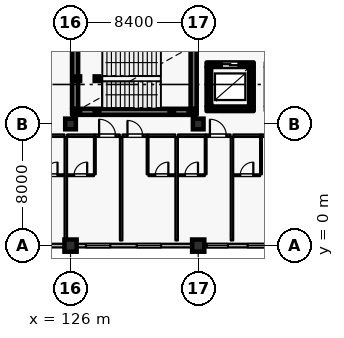
"""IFC4 building model, lengths in metres.
Left out: names, types, materials, properties, quantities, classifications, styles, units other than length and angle.
Written with IfcOpenShell. Run it as: python <this file> out.ifc"""

import sys

from ifc_helpers import new_model, si_unit, direction, frame, frame_2d, origin, origin_2d, place, context, subcontext, project, spatial, rectangle, hollow_rectangle, extrude, element, fill, save


model = new_model("IFC4")
c1 = context("Model", 3, precision=1e-05, world=origin(), true_north=direction((0.0, 1.0)))
c2 = subcontext(c1, "Body", "Model", "MODEL_VIEW")
j1 = project(units=[si_unit("LENGTHUNIT", "METRE"), si_unit("PLANEANGLEUNIT", "RADIAN")], contexts=[c1])
p1 = place(None, origin())
s1 = spatial("IfcSite", under=j1, at=p1, CompositionType="ELEMENT")
p2 = place(p1, origin())
s2 = spatial("IfcBuilding", under=s1, at=p2, CompositionType="ELEMENT")
p3 = place(p2, frame((0.0, 0.0, 11.4)))
s3 = spatial("IfcBuildingStorey", under=s2, at=p3, CompositionType="ELEMENT", Elevation=11.4)
for number, where, z_axis, x_axis in (
    (1, (126.0, 0.0, 0.0), (0.0, 0.0, 1.0), (1.0, 0.0, 0.0)),
    (2, (134.4, 0.0, 0.0), (0.0, 0.0, 1.0), (1.0, 0.0, 0.0)),
):
    element("IfcColumn", number, at=place(p3, frame(where, z_axis=z_axis, x_axis=x_axis)), inside=s3, PredefinedType="COLUMN", context=c2, shape_type="SweptSolid", body=[
        extrude(rectangle(XDim=0.8, YDim=0.8, at=origin_2d()), origin(), (0.0, 0.0, 1.0), 4.8),
    ])
for number, where, z_axis, x_axis in (
    (3, (126.0, 8.0, 0.0), (0.0, 0.0, 1.0), (1.0, 0.0, 0.0)),
    (4, (134.4, 8.0, 0.0), (0.0, 0.0, 1.0), (1.0, 0.0, 0.0)),
):
    element("IfcColumn", number, at=place(p3, frame(where, z_axis=z_axis, x_axis=x_axis)), inside=s3, PredefinedType="COLUMN", context=c2, shape_type="SweptSolid", body=[
        extrude(rectangle(XDim=0.7, YDim=0.7, at=origin_2d()), origin(), (0.0, 0.0, 1.0), 4.8),
    ])
p4 = place(p3, frame((125.6, 0.0, 0.0), z_axis=(0.0, 0.0, 1.0), x_axis=(-1.0, 0.0, 0.0)))
e5 = element("IfcWall", 5, at=p4, inside=s3, PredefinedType="SOLIDWALL", context=c2, shape_type="SweptSolid", body=[
    extrude(rectangle(XDim=7.6, YDim=0.24, at=frame_2d((3.8, 0.0))), origin(), (0.0, 0.0, 1.0), 4.13),
])
p5 = place(p4, frame((0.935, 0.0, 0.8)))
e6 = element("IfcOpeningElement", 6, at=p5, cuts=e5, PredefinedType="OPENING", context=c2, shape_type="SweptSolid", body=[
    extrude(rectangle(XDim=1.6, YDim=1.6, at=frame_2d((0.8, 0.8))), frame((0.0, 0.13, 0.0), z_axis=(0.0, -1.0, 0.0), x_axis=(1.0, 0.0, 0.0)), (0.0, 0.0, 1.0), 0.26),
])
p6 = place(p4, frame((4.58, 0.0, 0.8)))
e7 = element("IfcOpeningElement", 7, at=p6, cuts=e5, PredefinedType="OPENING", context=c2, shape_type="SweptSolid", body=[
    extrude(rectangle(XDim=1.6, YDim=1.6, at=frame_2d((0.8, 0.8))), frame((0.0, 0.13, 0.0), z_axis=(0.0, -1.0, 0.0), x_axis=(1.0, 0.0, 0.0)), (0.0, 0.0, 1.0), 0.26),
])
p7 = place(p3, frame((134.0, 0.0, 0.0), z_axis=(0.0, 0.0, 1.0), x_axis=(-1.0, 0.0, 0.0)))
e8 = element("IfcWall", 8, at=p7, inside=s3, PredefinedType="SOLIDWALL", context=c2, shape_type="SweptSolid", body=[
    extrude(rectangle(XDim=7.6, YDim=0.24, at=frame_2d((3.8, 0.0))), origin(), (0.0, 0.0, 1.0), 4.13),
])
p8 = place(p7, frame((2.045, 0.0, 0.8)))
e9 = element("IfcOpeningElement", 9, at=p8, cuts=e8, PredefinedType="OPENING", context=c2, shape_type="SweptSolid", body=[
    extrude(rectangle(XDim=1.6, YDim=1.6, at=frame_2d((0.8, 0.8))), frame((0.0, 0.13, 0.0), z_axis=(0.0, -1.0, 0.0), x_axis=(1.0, 0.0, 0.0)), (0.0, 0.0, 1.0), 0.26),
])
p9 = place(p7, frame((5.385, 0.0, 0.8)))
e10 = element("IfcOpeningElement", 10, at=p9, cuts=e8, PredefinedType="OPENING", context=c2, shape_type="SweptSolid", body=[
    extrude(rectangle(XDim=1.6, YDim=1.6, at=frame_2d((0.8, 0.8))), frame((0.0, 0.13, 0.0), z_axis=(0.0, -1.0, 0.0), x_axis=(1.0, 0.0, 0.0)), (0.0, 0.0, 1.0), 0.26),
])
p10 = place(p3, frame((142.4, 0.0, 0.0), z_axis=(0.0, 0.0, 1.0), x_axis=(-1.0, 0.0, 0.0)))
e11 = element("IfcWall", 11, at=p10, inside=s3, PredefinedType="SOLIDWALL", context=c2, shape_type="SweptSolid", body=[
    extrude(rectangle(XDim=7.6, YDim=0.24, at=frame_2d((3.8, 0.0))), origin(), (0.0, 0.0, 1.0), 4.13),
])
p11 = place(p10, frame((0.215, 0.0, 0.8)))
e12 = element("IfcOpeningElement", 12, at=p11, cuts=e11, PredefinedType="OPENING", context=c2, shape_type="SweptSolid", body=[
    extrude(rectangle(XDim=1.6, YDim=1.6, at=frame_2d((0.8, 0.8))), frame((0.0, 0.13, 0.0), z_axis=(0.0, -1.0, 0.0), x_axis=(1.0, 0.0, 0.0)), (0.0, 0.0, 1.0), 0.26),
])
p12 = place(p10, frame((3.155, 0.0, 0.8)))
e13 = element("IfcOpeningElement", 13, at=p12, cuts=e11, PredefinedType="OPENING", context=c2, shape_type="SweptSolid", body=[
    extrude(rectangle(XDim=1.6, YDim=1.6, at=frame_2d((0.8, 0.8))), frame((0.0, 0.13, 0.0), z_axis=(0.0, -1.0, 0.0), x_axis=(1.0, 0.0, 0.0)), (0.0, 0.0, 1.0), 0.26),
])
p13 = place(p10, frame((6.04, 0.0, 0.8)))
e14 = element("IfcOpeningElement", 14, at=p13, cuts=e11, PredefinedType="OPENING", context=c2, shape_type="SweptSolid", body=[
    extrude(rectangle(XDim=1.4, YDim=1.6, at=frame_2d((0.7, 0.8))), frame((0.0, 0.13, 0.0), z_axis=(0.0, -1.0, 0.0), x_axis=(1.0, 0.0, 0.0)), (0.0, 0.0, 1.0), 0.26),
])
p14 = place(p3, frame((134.95, 9.0, 0.0), z_axis=(0.0, 0.0, 1.0), x_axis=(1.0, 0.0, 0.0)))
e15 = element("IfcWall", 15, at=p14, inside=s3, PredefinedType="SHEAR", context=c2, shape_type="SweptSolid", body=[
    extrude(rectangle(XDim=3.1, YDim=0.3, at=frame_2d((1.55, 0.0))), origin(), (0.0, 0.0, 1.0), 4.535),
])
p15 = place(p3, frame((137.9, 9.155, 0.0), z_axis=(0.0, 0.0, 1.0), x_axis=(0.0, 1.0, 0.0)))
e16 = element("IfcWall", 16, at=p15, inside=s3, PredefinedType="SHEAR", context=c2, shape_type="SweptSolid", body=[
    extrude(rectangle(XDim=2.59, YDim=0.3, at=frame_2d((1.295, 0.0))), origin(), (0.0, 0.0, 1.0), 4.535),
])
p16 = place(p3, frame((138.05, 11.9, 0.0), z_axis=(0.0, 0.0, 1.0), x_axis=(-1.0, 0.0, 0.0)))
e17 = element("IfcWall", 17, at=p16, inside=s3, PredefinedType="SHEAR", context=c2, shape_type="SweptSolid", body=[
    extrude(rectangle(XDim=3.1, YDim=0.3, at=frame_2d((1.55, 0.0))), origin(), (0.0, 0.0, 1.0), 4.535),
])
p17 = place(p16, frame((1.0, 0.0, 0.0)))
e18 = element("IfcOpeningElement", 18, at=p17, cuts=e17, PredefinedType="OPENING", context=c2, shape_type="SweptSolid", body=[
    extrude(rectangle(XDim=1.1, YDim=2.2, at=frame_2d((0.55, 1.1))), frame((0.0, 0.16, 0.0), z_axis=(0.0, -1.0, 0.0), x_axis=(1.0, 0.0, 0.0)), (0.0, 0.0, 1.0), 0.32),
])
p18 = place(p3, frame((135.1, 11.745, 0.0), z_axis=(0.0, 0.0, 1.0), x_axis=(0.0, -1.0, 0.0)))
e19 = element("IfcWall", 19, at=p18, inside=s3, PredefinedType="SHEAR", context=c2, shape_type="SweptSolid", body=[
    extrude(rectangle(XDim=2.59, YDim=0.3, at=frame_2d((1.295, 0.0))), origin(), (0.0, 0.0, 1.0), 4.535),
])
p19 = place(p3, frame((126.1, 8.8, 0.0), z_axis=(0.0, 0.0, 1.0), x_axis=(1.0, 0.0, 0.0)))
e20 = element("IfcWall", 20, at=p19, inside=s3, PredefinedType="SHEAR", context=c2, shape_type="SweptSolid", body=[
    extrude(rectangle(XDim=8.2, YDim=0.4, at=frame_2d((4.1, 0.0))), origin(), (0.0, 0.0, 1.0), 4.535),
])
for number, where, z_axis, x_axis in (
    (21, (134.1, 9.005, 0.0), (0.0, 0.0, 1.0), (0.0, 1.0, 0.0)),
    (22, (126.3, 9.005, 0.0), (0.0, 0.0, 1.0), (0.0, 1.0, 0.0)),
):
    element("IfcWall", number, at=place(p3, frame(where, z_axis=z_axis, x_axis=x_axis)), inside=s3, PredefinedType="SHEAR", context=c2, shape_type="SweptSolid", body=[
        extrude(rectangle(XDim=3.95, YDim=0.4, at=frame_2d((1.975, 0.0))), origin(), (0.0, 0.0, 1.0), 4.535),
    ])
for number, where, z_axis, x_axis in (
    (23, (126.48, 8.8, 0.0), (0.0, 0.0, 1.0), (1.0, 0.0, 0.0)),
    (24, (126.48, 10.98, 0.0), (0.0, 0.0, 1.0), (1.0, 0.0, 0.0)),
    (25, (127.74, 8.8, 0.0), (0.0, 0.0, 1.0), (1.0, 0.0, 0.0)),
    (26, (127.74, 10.98, 0.0), (0.0, 0.0, 1.0), (1.0, 0.0, 0.0)),
):
    element("IfcColumn", number, at=place(p3, frame(where, z_axis=z_axis, x_axis=x_axis)), inside=s3, PredefinedType="COLUMN", context=c2, shape_type="SweptSolid", body=[
        extrude(hollow_rectangle(XDim=0.3, YDim=0.3, WallThickness=0.012, at=origin_2d()), origin(), (0.0, 0.0, 1.0), 4.62),
    ])
for number, where, z_axis, x_axis in (
    (27, (132.66, 8.8, -2.7), (0.0, 0.0, 1.0), (1.0, 0.0, 0.0)),
    (28, (133.92, 8.8, -2.7), (0.0, 0.0, 1.0), (1.0, 0.0, 0.0)),
):
    element("IfcColumn", number, at=place(p3, frame(where, z_axis=z_axis, x_axis=x_axis)), inside=s3, PredefinedType="COLUMN", context=c2, shape_type="SweptSolid", body=[
        extrude(hollow_rectangle(XDim=0.3, YDim=0.3, WallThickness=0.012, at=origin_2d()), origin(), (0.0, 0.0, 1.0), 4.92),
    ])
p20 = place(p3, frame((123.79, 7.23, 0.0), z_axis=(0.0, 0.0, 1.0), x_axis=(1.0, 0.0, 0.0)))
e29 = element("IfcWall", 29, at=p20, inside=s3, PredefinedType="PARTITIONING", context=c2, shape_type="SweptSolid", body=[
    extrude(rectangle(XDim=1.81, YDim=0.16, at=frame_2d((0.905, 0.0))), origin(), (0.0, 0.0, 1.0), 4.535),
])
p21 = place(p3, frame((123.84, 4.63, 0.0), z_axis=(0.0, 0.0, 1.0), x_axis=(1.0, 0.0, 0.0)))
e30 = element("IfcWall", 30, at=p21, inside=s3, PredefinedType="PARTITIONING", context=c2, shape_type="SweptSolid", body=[
    extrude(rectangle(XDim=1.75, YDim=0.115, at=frame_2d((0.875, 0.0))), origin(), (0.0, 0.0, 1.0), 4.535),
])
p22 = place(p21, frame((0.445, 0.0, 0.0)))
e31 = element("IfcOpeningElement", 31, at=p22, cuts=e30, PredefinedType="OPENING", context=c2, shape_type="SweptSolid", body=[
    extrude(rectangle(XDim=0.86, YDim=2.12, at=frame_2d((0.43, 1.06))), frame((0.0, 0.067, 0.0), z_axis=(0.0, -1.0, 0.0), x_axis=(1.0, 0.0, 0.0)), (0.0, 0.0, 1.0), 0.135),
])
p23 = place(p3, frame((125.78, 7.23, 0.0), z_axis=(0.0, 0.0, 1.0), x_axis=(1.0, 0.0, 0.0)))
e32 = element("IfcWall", 32, at=p23, inside=s3, PredefinedType="PARTITIONING", context=c2, shape_type="SweptSolid", body=[
    extrude(rectangle(XDim=1.81, YDim=0.16, at=frame_2d((0.905, 0.0))), origin(), (0.0, 0.0, 1.0), 4.535),
])
p24 = place(p3, frame((127.6, 7.23, 0.0), z_axis=(0.0, 0.0, 1.0), x_axis=(1.0, 0.0, 0.0)))
e33 = element("IfcWall", 33, at=p24, inside=s3, PredefinedType="PARTITIONING", context=c2, shape_type="SweptSolid", body=[
    extrude(rectangle(XDim=1.64, YDim=0.16, at=frame_2d((0.82, 0.0))), origin(), (0.0, 0.0, 1.0), 4.535),
])
p25 = place(p24, frame((0.28, 0.0, 0.0)))
e34 = element("IfcOpeningElement", 34, at=p25, cuts=e33, PredefinedType="OPENING", context=c2, shape_type="SweptSolid", body=[
    extrude(rectangle(XDim=1.08, YDim=2.3, at=frame_2d((0.54, 1.15))), frame((0.0, 0.09, 0.0), z_axis=(0.0, -1.0, 0.0), x_axis=(1.0, 0.0, 0.0)), (0.0, 0.0, 1.0), 0.18),
])
p26 = place(p3, frame((127.6, 4.69, 0.0), z_axis=(0.0, 0.0, 1.0), x_axis=(0.0, 1.0, 0.0)))
e35 = element("IfcWall", 35, at=p26, inside=s3, PredefinedType="PARTITIONING", context=c2, shape_type="SweptSolid", body=[
    extrude(rectangle(XDim=2.45, YDim=0.115, at=frame_2d((1.225, 0.0))), origin(), (0.0, 0.0, 1.0), 4.535),
])
p27 = place(p3, frame((125.79, 4.63, 0.0), z_axis=(0.0, 0.0, 1.0), x_axis=(1.0, 0.0, 0.0)))
e36 = element("IfcWall", 36, at=p27, inside=s3, PredefinedType="PARTITIONING", context=c2, shape_type="SweptSolid", body=[
    extrude(rectangle(XDim=1.75, YDim=0.115, at=frame_2d((0.875, 0.0))), origin(), (0.0, 0.0, 1.0), 4.535),
])
p28 = place(p27, frame((0.445, 0.0, 0.0)))
e37 = element("IfcOpeningElement", 37, at=p28, cuts=e36, PredefinedType="OPENING", context=c2, shape_type="SweptSolid", body=[
    extrude(rectangle(XDim=0.86, YDim=2.12, at=frame_2d((0.43, 1.06))), frame((0.0, 0.067, 0.0), z_axis=(0.0, -1.0, 0.0), x_axis=(1.0, 0.0, 0.0)), (0.0, 0.0, 1.0), 0.135),
])
p29 = place(p3, frame((125.69, 0.34, 0.0), z_axis=(0.0, 0.0, 1.0), x_axis=(0.0, 1.0, 0.0)))
e38 = element("IfcWall", 38, at=p29, inside=s3, PredefinedType="PARTITIONING", context=c2, shape_type="SweptSolid", body=[
    extrude(rectangle(XDim=6.8, YDim=0.16, at=frame_2d((3.4, 0.0))), origin(), (0.0, 0.0, 1.0), 4.535),
])
p30 = place(p3, frame((129.42, 7.23, 0.0), z_axis=(0.0, 0.0, 1.0), x_axis=(1.0, 0.0, 0.0)))
e39 = element("IfcWall", 39, at=p30, inside=s3, PredefinedType="PARTITIONING", context=c2, shape_type="SweptSolid", body=[
    extrude(rectangle(XDim=1.65, YDim=0.16, at=frame_2d((0.825, 0.0))), origin(), (0.0, 0.0, 1.0), 4.535),
])
p31 = place(p30, frame((0.325, 0.0, 0.0)))
e40 = element("IfcOpeningElement", 40, at=p31, cuts=e39, PredefinedType="OPENING", context=c2, shape_type="SweptSolid", body=[
    extrude(rectangle(XDim=1.0, YDim=2.25, at=frame_2d((0.5, 1.125))), frame((0.0, 0.09, 0.0), z_axis=(0.0, -1.0, 0.0), x_axis=(1.0, 0.0, 0.0)), (0.0, 0.0, 1.0), 0.18),
])
p32 = place(p3, frame((131.08, 7.23, 0.0), z_axis=(0.0, 0.0, 1.0), x_axis=(1.0, 0.0, 0.0)))
e41 = element("IfcWall", 41, at=p32, inside=s3, PredefinedType="PARTITIONING", context=c2, shape_type="SweptSolid", body=[
    extrude(rectangle(XDim=1.81, YDim=0.16, at=frame_2d((0.905, 0.0))), origin(), (0.0, 0.0, 1.0), 4.535),
])
p33 = place(p3, frame((131.07, 4.69, 0.0), z_axis=(0.0, 0.0, 1.0), x_axis=(0.0, 1.0, 0.0)))
e42 = element("IfcWall", 42, at=p33, inside=s3, PredefinedType="PARTITIONING", context=c2, shape_type="SweptSolid", body=[
    extrude(rectangle(XDim=2.45, YDim=0.115, at=frame_2d((1.225, 0.0))), origin(), (0.0, 0.0, 1.0), 4.535),
])
p34 = place(p3, frame((131.13, 4.63, 0.0), z_axis=(0.0, 0.0, 1.0), x_axis=(1.0, 0.0, 0.0)))
e43 = element("IfcWall", 43, at=p34, inside=s3, PredefinedType="PARTITIONING", context=c2, shape_type="SweptSolid", body=[
    extrude(rectangle(XDim=1.75, YDim=0.115, at=frame_2d((0.875, 0.0))), origin(), (0.0, 0.0, 1.0), 4.535),
])
p35 = place(p34, frame((0.445, 0.0, 0.0)))
e44 = element("IfcOpeningElement", 44, at=p35, cuts=e43, PredefinedType="OPENING", context=c2, shape_type="SweptSolid", body=[
    extrude(rectangle(XDim=0.86, YDim=2.12, at=frame_2d((0.43, 1.06))), frame((0.0, 0.067, 0.0), z_axis=(0.0, -1.0, 0.0), x_axis=(1.0, 0.0, 0.0)), (0.0, 0.0, 1.0), 0.135),
])
p36 = place(p3, frame((129.33, 0.34, 0.0), z_axis=(0.0, 0.0, 1.0), x_axis=(0.0, 1.0, 0.0)))
e45 = element("IfcWall", 45, at=p36, inside=s3, PredefinedType="PARTITIONING", context=c2, shape_type="SweptSolid", body=[
    extrude(rectangle(XDim=6.8, YDim=0.16, at=frame_2d((3.4, 0.0))), origin(), (0.0, 0.0, 1.0), 4.535),
])
p37 = place(p3, frame((133.07, 7.23, 0.0), z_axis=(0.0, 0.0, 1.0), x_axis=(1.0, 0.0, 0.0)))
e46 = element("IfcWall", 46, at=p37, inside=s3, PredefinedType="PARTITIONING", context=c2, shape_type="SweptSolid", body=[
    extrude(rectangle(XDim=1.81, YDim=0.16, at=frame_2d((0.905, 0.0))), origin(), (0.0, 0.0, 1.0), 4.535),
])
p38 = place(p3, frame((134.89, 7.23, 0.0), z_axis=(0.0, 0.0, 1.0), x_axis=(1.0, 0.0, 0.0)))
e47 = element("IfcWall", 47, at=p38, inside=s3, PredefinedType="PARTITIONING", context=c2, shape_type="SweptSolid", body=[
    extrude(rectangle(XDim=1.64, YDim=0.16, at=frame_2d((0.82, 0.0))), origin(), (0.0, 0.0, 1.0), 4.535),
])
p39 = place(p38, frame((0.28, 0.0, 0.0)))
e48 = element("IfcOpeningElement", 48, at=p39, cuts=e47, PredefinedType="OPENING", context=c2, shape_type="SweptSolid", body=[
    extrude(rectangle(XDim=1.08, YDim=2.3, at=frame_2d((0.54, 1.15))), frame((0.0, 0.09, 0.0), z_axis=(0.0, -1.0, 0.0), x_axis=(1.0, 0.0, 0.0)), (0.0, 0.0, 1.0), 0.18),
])
p40 = place(p3, frame((134.89, 4.69, 0.0), z_axis=(0.0, 0.0, 1.0), x_axis=(0.0, 1.0, 0.0)))
e49 = element("IfcWall", 49, at=p40, inside=s3, PredefinedType="PARTITIONING", context=c2, shape_type="SweptSolid", body=[
    extrude(rectangle(XDim=2.45, YDim=0.115, at=frame_2d((1.225, 0.0))), origin(), (0.0, 0.0, 1.0), 4.535),
])
p41 = place(p3, frame((133.08, 4.63, 0.0), z_axis=(0.0, 0.0, 1.0), x_axis=(1.0, 0.0, 0.0)))
e50 = element("IfcWall", 50, at=p41, inside=s3, PredefinedType="PARTITIONING", context=c2, shape_type="SweptSolid", body=[
    extrude(rectangle(XDim=1.75, YDim=0.115, at=frame_2d((0.875, 0.0))), origin(), (0.0, 0.0, 1.0), 4.535),
])
p42 = place(p41, frame((0.445, 0.0, 0.0)))
e51 = element("IfcOpeningElement", 51, at=p42, cuts=e50, PredefinedType="OPENING", context=c2, shape_type="SweptSolid", body=[
    extrude(rectangle(XDim=0.86, YDim=2.12, at=frame_2d((0.43, 1.06))), frame((0.0, 0.067, 0.0), z_axis=(0.0, -1.0, 0.0), x_axis=(1.0, 0.0, 0.0)), (0.0, 0.0, 1.0), 0.135),
])
p43 = place(p3, frame((132.98, 0.34, 0.0), z_axis=(0.0, 0.0, 1.0), x_axis=(0.0, 1.0, 0.0)))
e52 = element("IfcWall", 52, at=p43, inside=s3, PredefinedType="PARTITIONING", context=c2, shape_type="SweptSolid", body=[
    extrude(rectangle(XDim=6.8, YDim=0.16, at=frame_2d((3.4, 0.0))), origin(), (0.0, 0.0, 1.0), 4.535),
])
p44 = place(p3, frame((136.71, 7.23, 0.0), z_axis=(0.0, 0.0, 1.0), x_axis=(1.0, 0.0, 0.0)))
e53 = element("IfcWall", 53, at=p44, inside=s3, PredefinedType="PARTITIONING", context=c2, shape_type="SweptSolid", body=[
    extrude(rectangle(XDim=1.81, YDim=0.16, at=frame_2d((0.905, 0.0))), origin(), (0.0, 0.0, 1.0), 4.535),
])
p45 = place(p3, frame((138.53, 7.23, 0.0), z_axis=(0.0, 0.0, 1.0), x_axis=(1.0, 0.0, 0.0)))
e54 = element("IfcWall", 54, at=p45, inside=s3, PredefinedType="PARTITIONING", context=c2, shape_type="SweptSolid", body=[
    extrude(rectangle(XDim=1.65, YDim=0.16, at=frame_2d((0.825, 0.0))), origin(), (0.0, 0.0, 1.0), 4.535),
])
p46 = place(p45, frame((0.325, 0.0, 0.0)))
e55 = element("IfcOpeningElement", 55, at=p46, cuts=e54, PredefinedType="OPENING", context=c2, shape_type="SweptSolid", body=[
    extrude(rectangle(XDim=1.0, YDim=2.25, at=frame_2d((0.5, 1.125))), frame((0.0, 0.09, 0.0), z_axis=(0.0, -1.0, 0.0), x_axis=(1.0, 0.0, 0.0)), (0.0, 0.0, 1.0), 0.18),
])
p47 = place(p3, frame((138.53, 4.69, 0.0), z_axis=(0.0, 0.0, 1.0), x_axis=(0.0, 1.0, 0.0)))
e56 = element("IfcWall", 56, at=p47, inside=s3, PredefinedType="PARTITIONING", context=c2, shape_type="SweptSolid", body=[
    extrude(rectangle(XDim=2.45, YDim=0.115, at=frame_2d((1.225, 0.0))), origin(), (0.0, 0.0, 1.0), 4.535),
])
p48 = place(p3, frame((136.72, 4.63, 0.0), z_axis=(0.0, 0.0, 1.0), x_axis=(1.0, 0.0, 0.0)))
e57 = element("IfcWall", 57, at=p48, inside=s3, PredefinedType="PARTITIONING", context=c2, shape_type="SweptSolid", body=[
    extrude(rectangle(XDim=1.75, YDim=0.115, at=frame_2d((0.875, 0.0))), origin(), (0.0, 0.0, 1.0), 4.535),
])
p49 = place(p48, frame((0.445, 0.0, 0.0)))
e58 = element("IfcOpeningElement", 58, at=p49, cuts=e57, PredefinedType="OPENING", context=c2, shape_type="SweptSolid", body=[
    extrude(rectangle(XDim=0.86, YDim=2.12, at=frame_2d((0.43, 1.06))), frame((0.0, 0.067, 0.0), z_axis=(0.0, -1.0, 0.0), x_axis=(1.0, 0.0, 0.0)), (0.0, 0.0, 1.0), 0.135),
])
p50 = place(p3, frame((136.62, 0.34, 0.0), z_axis=(0.0, 0.0, 1.0), x_axis=(0.0, 1.0, 0.0)))
e59 = element("IfcWall", 59, at=p50, inside=s3, PredefinedType="PARTITIONING", context=c2, shape_type="SweptSolid", body=[
    extrude(rectangle(XDim=6.8, YDim=0.16, at=frame_2d((3.4, 0.0))), origin(), (0.0, 0.0, 1.0), 4.535),
])
p51 = place(p8, origin())
e60 = element("IfcWindow", 60, at=p51, inside=s3, PartitioningType="SINGLE_PANEL", PredefinedType="WINDOW", context=c2, shape_type="SweptSolid", body=[
    extrude(rectangle(XDim=1.6, YDim=1.6, at=frame_2d((0.8, 0.8))), frame((0.0, 0.03, 0.0), z_axis=(0.0, -1.0, 0.0), x_axis=(1.0, 0.0, 0.0)), (0.0, 0.0, 1.0), 0.06),
])
fill(e9, e60)
p52 = place(p9, origin())
e61 = element("IfcWindow", 61, at=p52, inside=s3, PartitioningType="SINGLE_PANEL", PredefinedType="WINDOW", context=c2, shape_type="SweptSolid", body=[
    extrude(rectangle(XDim=1.6, YDim=1.6, at=frame_2d((0.8, 0.8))), frame((0.0, 0.03, 0.0), z_axis=(0.0, -1.0, 0.0), x_axis=(1.0, 0.0, 0.0)), (0.0, 0.0, 1.0), 0.06),
])
fill(e10, e61)
p53 = place(p12, origin())
e62 = element("IfcWindow", 62, at=p53, inside=s3, PartitioningType="SINGLE_PANEL", PredefinedType="WINDOW", context=c2, shape_type="SweptSolid", body=[
    extrude(rectangle(XDim=1.6, YDim=1.6, at=frame_2d((0.8, 0.8))), frame((0.0, 0.03, 0.0), z_axis=(0.0, -1.0, 0.0), x_axis=(1.0, 0.0, 0.0)), (0.0, 0.0, 1.0), 0.06),
])
fill(e13, e62)
p54 = place(p13, origin())
e63 = element("IfcWindow", 63, at=p54, inside=s3, PartitioningType="SINGLE_PANEL", PredefinedType="WINDOW", context=c2, shape_type="SweptSolid", body=[
    extrude(rectangle(XDim=1.4, YDim=1.6, at=frame_2d((0.7, 0.8))), frame((0.0, 0.03, 0.0), z_axis=(0.0, -1.0, 0.0), x_axis=(1.0, 0.0, 0.0)), (0.0, 0.0, 1.0), 0.06),
])
fill(e14, e63)
p55 = place(p17, origin())
e64 = element("IfcDoor", 64, at=p55, inside=s3, OperationType="DOUBLE_DOOR_SLIDING", PredefinedType="DOOR", context=c2, shape_type="SweptSolid", body=[
    extrude(rectangle(XDim=1.1, YDim=2.2, at=frame_2d((0.55, 1.1))), frame((0.0, 0.025, 0.0), z_axis=(0.0, -1.0, 0.0), x_axis=(1.0, 0.0, 0.0)), (0.0, 0.0, 1.0), 0.05),
])
fill(e18, e64)
p56 = place(p22, origin())
e65 = element("IfcDoor", 65, at=p56, inside=s3, OperationType="SINGLE_SWING_RIGHT", PredefinedType="DOOR", context=c2, shape_type="SweptSolid", body=[
    extrude(rectangle(XDim=0.86, YDim=2.12, at=frame_2d((0.43, 1.06))), frame((0.0, 0.025, 0.0), z_axis=(0.0, -1.0, 0.0), x_axis=(1.0, 0.0, 0.0)), (0.0, 0.0, 1.0), 0.05),
])
fill(e31, e65)
p57 = place(p25, origin())
e66 = element("IfcDoor", 66, at=p57, inside=s3, OperationType="SINGLE_SWING_LEFT", PredefinedType="DOOR", context=c2, shape_type="SweptSolid", body=[
    extrude(rectangle(XDim=1.08, YDim=2.3, at=frame_2d((0.54, 1.15))), frame((0.0, 0.025, 0.0), z_axis=(0.0, -1.0, 0.0), x_axis=(1.0, 0.0, 0.0)), (0.0, 0.0, 1.0), 0.05),
])
fill(e34, e66)
p58 = place(p28, origin())
e67 = element("IfcDoor", 67, at=p58, inside=s3, OperationType="SINGLE_SWING_RIGHT", PredefinedType="DOOR", context=c2, shape_type="SweptSolid", body=[
    extrude(rectangle(XDim=0.86, YDim=2.12, at=frame_2d((0.43, 1.06))), frame((0.0, 0.025, 0.0), z_axis=(0.0, -1.0, 0.0), x_axis=(1.0, 0.0, 0.0)), (0.0, 0.0, 1.0), 0.05),
])
fill(e37, e67)
p59 = place(p31, origin())
e68 = element("IfcDoor", 68, at=p59, inside=s3, OperationType="SINGLE_SWING_LEFT", PredefinedType="DOOR", context=c2, shape_type="SweptSolid", body=[
    extrude(rectangle(XDim=1.0, YDim=2.25, at=frame_2d((0.5, 1.125))), frame((0.0, 0.025, 0.0), z_axis=(0.0, -1.0, 0.0), x_axis=(1.0, 0.0, 0.0)), (0.0, 0.0, 1.0), 0.05),
])
fill(e40, e68)
p60 = place(p35, origin())
e69 = element("IfcDoor", 69, at=p60, inside=s3, OperationType="SINGLE_SWING_RIGHT", PredefinedType="DOOR", context=c2, shape_type="SweptSolid", body=[
    extrude(rectangle(XDim=0.86, YDim=2.12, at=frame_2d((0.43, 1.06))), frame((0.0, 0.025, 0.0), z_axis=(0.0, -1.0, 0.0), x_axis=(1.0, 0.0, 0.0)), (0.0, 0.0, 1.0), 0.05),
])
fill(e44, e69)
p61 = place(p39, origin())
e70 = element("IfcDoor", 70, at=p61, inside=s3, OperationType="SINGLE_SWING_LEFT", PredefinedType="DOOR", context=c2, shape_type="SweptSolid", body=[
    extrude(rectangle(XDim=1.08, YDim=2.3, at=frame_2d((0.54, 1.15))), frame((0.0, 0.025, 0.0), z_axis=(0.0, -1.0, 0.0), x_axis=(1.0, 0.0, 0.0)), (0.0, 0.0, 1.0), 0.05),
])
fill(e48, e70)
p62 = place(p42, origin())
e71 = element("IfcDoor", 71, at=p62, inside=s3, OperationType="SINGLE_SWING_RIGHT", PredefinedType="DOOR", context=c2, shape_type="SweptSolid", body=[
    extrude(rectangle(XDim=0.86, YDim=2.12, at=frame_2d((0.43, 1.06))), frame((0.0, 0.025, 0.0), z_axis=(0.0, -1.0, 0.0), x_axis=(1.0, 0.0, 0.0)), (0.0, 0.0, 1.0), 0.05),
])
fill(e51, e71)
p63 = place(p49, origin())
e72 = element("IfcDoor", 72, at=p63, inside=s3, OperationType="SINGLE_SWING_RIGHT", PredefinedType="DOOR", context=c2, shape_type="SweptSolid", body=[
    extrude(rectangle(XDim=0.86, YDim=2.12, at=frame_2d((0.43, 1.06))), frame((0.0, 0.025, 0.0), z_axis=(0.0, -1.0, 0.0), x_axis=(1.0, 0.0, 0.0)), (0.0, 0.0, 1.0), 0.05),
])
fill(e58, e72)
save(model, sys.argv[1])
